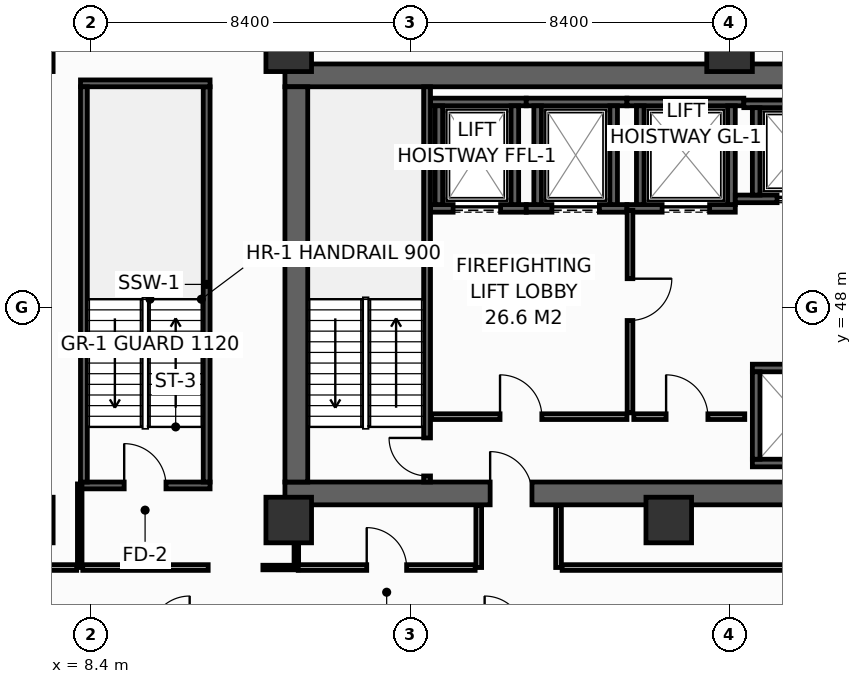
"""IFC4 building model, lengths in metres.
Left out: names, types, materials, properties, quantities, classifications, styles, units other than length and angle.
Written with IfcOpenShell. Run it as: python <this file> out.ifc"""

import sys

from ifc_helpers import new_model, si_unit, direction, frame, frame_2d, origin, origin_2d, place, context, subcontext, project, spatial, rectangle, hollow_rectangle, extrude, element, fill, save


model = new_model("IFC4")
c1 = context("Model", 3, precision=1e-05, world=origin(), true_north=direction((0.0, 1.0)))
c2 = subcontext(c1, "Body", "Model", "MODEL_VIEW")
j1 = project(units=[si_unit("LENGTHUNIT", "METRE"), si_unit("PLANEANGLEUNIT", "RADIAN")], contexts=[c1])
p1 = place(None, origin())
s1 = spatial("IfcSite", under=j1, at=p1, CompositionType="ELEMENT")
p2 = place(p1, origin())
s2 = spatial("IfcBuilding", under=s1, at=p2, CompositionType="ELEMENT")
p3 = place(p2, frame((0.0, 0.0, 64.8)))
s3 = spatial("IfcBuildingStorey", under=s2, at=p3, CompositionType="ELEMENT", Elevation=64.8)
p4 = place(p3, frame((13.5, 43.1, 0.0), z_axis=(0.0, 0.0, 1.0), x_axis=(1.0, 0.0, 0.0)))
e1 = element("IfcWall", 1, at=p4, inside=s3, PredefinedType="SHEAR", context=c2, shape_type="SweptSolid", body=[
    extrude(rectangle(XDim=32.9, YDim=0.6, at=frame_2d((16.45, 0.0))), origin(), (0.0, 0.0, 1.0), 4.15),
])
p5 = place(p4, frame((5.4, 0.0, 0.0)))
e2 = element("IfcOpeningElement", 2, at=p5, cuts=e1, PredefinedType="OPENING", context=c2, shape_type="SweptSolid", body=[
    extrude(rectangle(XDim=1.1, YDim=2.15, at=frame_2d((0.55, 1.075))), frame((0.0, 0.31, 0.0), z_axis=(0.0, -1.0, 0.0), x_axis=(1.0, 0.0, 0.0)), (0.0, 0.0, 1.0), 0.62),
])
p6 = place(p4, frame((25.6, 0.0, 0.0)))
e3 = element("IfcOpeningElement", 3, at=p6, cuts=e1, PredefinedType="OPENING", context=c2, shape_type="SweptSolid", body=[
    extrude(rectangle(XDim=1.1, YDim=2.15, at=frame_2d((0.55, 1.075))), frame((0.0, 0.31, 0.0), z_axis=(0.0, -1.0, 0.0), x_axis=(1.0, 0.0, 0.0)), (0.0, 0.0, 1.0), 0.62),
])
p7 = place(p3, frame((13.5, 54.1, 0.0), z_axis=(0.0, 0.0, 1.0), x_axis=(1.0, 0.0, 0.0)))
e4 = element("IfcWall", 4, at=p7, inside=s3, PredefinedType="SHEAR", context=c2, shape_type="SweptSolid", body=[
    extrude(rectangle(XDim=32.9, YDim=0.6, at=frame_2d((16.45, 0.0))), origin(), (0.0, 0.0, 1.0), 4.15),
])
p8 = place(p3, frame((13.8, 43.4, 0.0), z_axis=(0.0, 0.0, 1.0), x_axis=(0.0, 1.0, 0.0)))
e5 = element("IfcWall", 5, at=p8, inside=s3, PredefinedType="SHEAR", context=c2, shape_type="SweptSolid", body=[
    extrude(rectangle(XDim=10.4, YDim=0.6, at=frame_2d((5.2, 0.0))), origin(), (0.0, 0.0, 1.0), 4.15),
])
for number, where, z_axis, x_axis in (
    (6, (6.8, 54.8, 0.0), (0.0, 0.0, 1.0), (1.0, 0.0, 0.0)),
    (7, (13.6, 54.8, 0.0), (0.0, 0.0, 1.0), (1.0, 0.0, 0.0)),
    (8, (25.2, 54.8, 0.0), (0.0, 0.0, 1.0), (1.0, 0.0, 0.0)),
    (9, (6.8, 42.4, 0.0), (0.0, 0.0, 1.0), (1.0, 0.0, 0.0)),
    (10, (13.6, 42.4, 0.0), (0.0, 0.0, 1.0), (1.0, 0.0, 0.0)),
    (11, (23.6, 42.4, 0.0), (0.0, 0.0, 1.0), (1.0, 0.0, 0.0)),
):
    element("IfcColumn", number, at=place(p3, frame(where, z_axis=z_axis, x_axis=x_axis)), inside=s3, PredefinedType="COLUMN", context=c2, shape_type="SweptSolid", body=[
        extrude(hollow_rectangle(XDim=1.2, YDim=1.2, WallThickness=0.055, at=origin_2d()), origin(), (0.0, 0.0, 1.0), 4.4),
    ])
p9 = place(p3, frame((17.33, 50.6, 0.0), z_axis=(0.0, 0.0, 1.0), x_axis=(1.0, 0.0, 0.0)))
e12 = element("IfcWall", 12, at=p9, inside=s3, PredefinedType="SHEAR", context=c2, shape_type="SweptSolid", body=[
    extrude(rectangle(XDim=2.52, YDim=0.2, at=frame_2d((1.26, 0.0))), origin(), (0.0, 0.0, 1.0), 4.15),
])
p10 = place(p9, frame((0.595, 0.0, 0.0)))
e13 = element("IfcOpeningElement", 13, at=p10, cuts=e12, PredefinedType="OPENING", context=c2, shape_type="SweptSolid", body=[
    extrude(rectangle(XDim=1.25, YDim=2.3, at=frame_2d((0.625, 1.15))), frame((0.0, 0.11, 0.0), z_axis=(0.0, -1.0, 0.0), x_axis=(1.0, 0.0, 0.0)), (0.0, 0.0, 1.0), 0.22),
])
p11 = place(p3, frame((17.33, 53.4, 0.0), z_axis=(0.0, 0.0, 1.0), x_axis=(1.0, 0.0, 0.0)))
e14 = element("IfcWall", 14, at=p11, inside=s3, PredefinedType="SHEAR", context=c2, shape_type="SweptSolid", body=[
    extrude(rectangle(XDim=2.52, YDim=0.2, at=frame_2d((1.26, 0.0))), origin(), (0.0, 0.0, 1.0), 4.15),
])
for number, where, z_axis, x_axis in (
    (15, (17.55, 50.7, 0.0), (0.0, 0.0, 1.0), (0.0, 1.0, 0.0)),
    (16, (19.55, 50.7, 0.0), (0.0, 0.0, 1.0), (0.0, 1.0, 0.0)),
):
    element("IfcWall", number, at=place(p3, frame(where, z_axis=z_axis, x_axis=x_axis)), inside=s3, PredefinedType="SHEAR", context=c2, shape_type="SweptSolid", body=[
        extrude(rectangle(XDim=2.6, YDim=0.2, at=frame_2d((1.3, 0.0))), origin(), (0.0, 0.0, 1.0), 4.15),
    ])
p12 = place(p3, frame((19.85, 50.6, 0.0), z_axis=(0.0, 0.0, 1.0), x_axis=(1.0, 0.0, 0.0)))
e17 = element("IfcWall", 17, at=p12, inside=s3, PredefinedType="SHEAR", context=c2, shape_type="SweptSolid", body=[
    extrude(rectangle(XDim=2.65, YDim=0.2, at=frame_2d((1.325, 0.0))), origin(), (0.0, 0.0, 1.0), 4.15),
])
p13 = place(p12, frame((0.675, 0.0, 0.0)))
e18 = element("IfcOpeningElement", 18, at=p13, cuts=e17, PredefinedType="OPENING", context=c2, shape_type="SweptSolid", body=[
    extrude(rectangle(XDim=1.25, YDim=2.3, at=frame_2d((0.625, 1.15))), frame((0.0, 0.11, 0.0), z_axis=(0.0, -1.0, 0.0), x_axis=(1.0, 0.0, 0.0)), (0.0, 0.0, 1.0), 0.22),
])
p14 = place(p3, frame((19.85, 53.4, 0.0), z_axis=(0.0, 0.0, 1.0), x_axis=(1.0, 0.0, 0.0)))
e19 = element("IfcWall", 19, at=p14, inside=s3, PredefinedType="SHEAR", context=c2, shape_type="SweptSolid", body=[
    extrude(rectangle(XDim=2.65, YDim=0.2, at=frame_2d((1.325, 0.0))), origin(), (0.0, 0.0, 1.0), 4.15),
])
for number, where, z_axis, x_axis in (
    (20, (20.15, 50.7, 0.0), (0.0, 0.0, 1.0), (0.0, 1.0, 0.0)),
    (21, (22.15, 50.7, 0.0), (0.0, 0.0, 1.0), (0.0, 1.0, 0.0)),
):
    element("IfcWall", number, at=place(p3, frame(where, z_axis=z_axis, x_axis=x_axis)), inside=s3, PredefinedType="SHEAR", context=c2, shape_type="SweptSolid", body=[
        extrude(rectangle(XDim=2.6, YDim=0.2, at=frame_2d((1.3, 0.0))), origin(), (0.0, 0.0, 1.0), 4.15),
    ])
p15 = place(p3, frame((22.5, 50.6, 0.0), z_axis=(0.0, 0.0, 1.0), x_axis=(1.0, 0.0, 0.0)))
e22 = element("IfcWall", 22, at=p15, inside=s3, PredefinedType="SHEAR", context=c2, shape_type="SweptSolid", body=[
    extrude(rectangle(XDim=2.85, YDim=0.2, at=frame_2d((1.425, 0.0))), origin(), (0.0, 0.0, 1.0), 4.15),
])
p16 = place(p15, frame((0.925, 0.0, 0.0)))
e23 = element("IfcOpeningElement", 23, at=p16, cuts=e22, PredefinedType="OPENING", context=c2, shape_type="SweptSolid", body=[
    extrude(rectangle(XDim=1.25, YDim=2.3, at=frame_2d((0.625, 1.15))), frame((0.0, 0.11, 0.0), z_axis=(0.0, -1.0, 0.0), x_axis=(1.0, 0.0, 0.0)), (0.0, 0.0, 1.0), 0.22),
])
p17 = place(p3, frame((22.5, 53.4, 0.0), z_axis=(0.0, 0.0, 1.0), x_axis=(1.0, 0.0, 0.0)))
e24 = element("IfcWall", 24, at=p17, inside=s3, PredefinedType="SHEAR", context=c2, shape_type="SweptSolid", body=[
    extrude(rectangle(XDim=3.075, YDim=0.2, at=frame_2d((1.538, 0.0))), origin(), (0.0, 0.0, 1.0), 4.15),
])
for number, where, z_axis, x_axis in (
    (25, (22.85, 50.7, 0.0), (0.0, 0.0, 1.0), (0.0, 1.0, 0.0)),
    (26, (25.25, 50.7, 0.0), (0.0, 0.0, 1.0), (0.0, 1.0, 0.0)),
):
    element("IfcWall", number, at=place(p3, frame(where, z_axis=z_axis, x_axis=x_axis)), inside=s3, PredefinedType="SHEAR", context=c2, shape_type="SweptSolid", body=[
        extrude(rectangle(XDim=2.6, YDim=0.2, at=frame_2d((1.3, 0.0))), origin(), (0.0, 0.0, 1.0), 4.15),
    ])
p18 = place(p3, frame((25.35, 50.85, 0.0), z_axis=(0.0, 0.0, 1.0), x_axis=(1.0, 0.0, 0.0)))
e27 = element("IfcWall", 27, at=p18, inside=s3, PredefinedType="SHEAR", context=c2, shape_type="SweptSolid", body=[
    extrude(rectangle(XDim=3.025, YDim=0.2, at=frame_2d((1.512, 0.0))), origin(), (0.0, 0.0, 1.0), 4.15),
])
p19 = place(p18, frame((1.1, 0.0, 0.0)))
e28 = element("IfcOpeningElement", 28, at=p19, cuts=e27, PredefinedType="OPENING", context=c2, shape_type="SweptSolid", body=[
    extrude(rectangle(XDim=1.1, YDim=2.2, at=frame_2d((0.55, 1.1))), frame((0.0, 0.11, 0.0), z_axis=(0.0, -1.0, 0.0), x_axis=(1.0, 0.0, 0.0)), (0.0, 0.0, 1.0), 0.22),
])
p20 = place(p3, frame((25.575, 53.35, 0.0), z_axis=(0.0, 0.0, 1.0), x_axis=(1.0, 0.0, 0.0)))
e29 = element("IfcWall", 29, at=p20, inside=s3, PredefinedType="SHEAR", context=c2, shape_type="SweptSolid", body=[
    extrude(rectangle(XDim=2.8, YDim=0.2, at=frame_2d((1.4, 0.0))), origin(), (0.0, 0.0, 1.0), 4.15),
])
p21 = place(p3, frame((25.9, 50.95, 0.0), z_axis=(0.0, 0.0, 1.0), x_axis=(0.0, 1.0, 0.0)))
e30 = element("IfcWall", 30, at=p21, inside=s3, PredefinedType="SHEAR", context=c2, shape_type="SweptSolid", body=[
    extrude(rectangle(XDim=2.3, YDim=0.2, at=frame_2d((1.15, 0.0))), origin(), (0.0, 0.0, 1.0), 4.15),
])
for number, where, z_axis, x_axis in (
    (31, (25.8, 43.9, 0.0), (0.0, 0.0, 1.0), (1.0, 0.0, 0.0)),
    (32, (25.8, 46.4, 0.0), (0.0, 0.0, 1.0), (1.0, 0.0, 0.0)),
):
    element("IfcWall", number, at=place(p3, frame(where, z_axis=z_axis, x_axis=x_axis)), inside=s3, PredefinedType="SHEAR", context=c2, shape_type="SweptSolid", body=[
        extrude(rectangle(XDim=2.575, YDim=0.2, at=frame_2d((1.288, 0.0))), origin(), (0.0, 0.0, 1.0), 4.15),
    ])
p22 = place(p3, frame((25.9, 44.0, 0.0), z_axis=(0.0, 0.0, 1.0), x_axis=(0.0, 1.0, 0.0)))
e33 = element("IfcWall", 33, at=p22, inside=s3, PredefinedType="SHEAR", context=c2, shape_type="SweptSolid", body=[
    extrude(rectangle(XDim=2.3, YDim=0.2, at=frame_2d((1.15, 0.0))), origin(), (0.0, 0.0, 1.0), 4.15),
])
p23 = place(p3, frame((17.24, 43.4, 0.0), z_axis=(0.0, 0.0, 1.0), x_axis=(0.0, 1.0, 0.0)))
e34 = element("IfcWall", 34, at=p23, inside=s3, PredefinedType="SHEAR", context=c2, shape_type="SweptSolid", body=[
    extrude(rectangle(XDim=10.4, YDim=0.18, at=frame_2d((5.2, 0.0))), origin(), (0.0, 0.0, 1.0), 4.15),
])
p24 = place(p23, frame((0.16, 0.0, 0.0)))
e35 = element("IfcOpeningElement", 35, at=p24, cuts=e34, PredefinedType="OPENING", context=c2, shape_type="SweptSolid", body=[
    extrude(rectangle(XDim=1.0, YDim=2.15, at=frame_2d((0.5, 1.075))), frame((0.0, 0.1, 0.0), z_axis=(0.0, -1.0, 0.0), x_axis=(1.0, 0.0, 0.0)), (0.0, 0.0, 1.0), 0.2),
])
p25 = place(p3, frame((8.12, 43.31, 0.0), z_axis=(0.0, 0.0, 1.0), x_axis=(1.0, 0.0, 0.0)))
e36 = element("IfcWall", 36, at=p25, inside=s3, PredefinedType="SHEAR", context=c2, shape_type="SweptSolid", body=[
    extrude(rectangle(XDim=3.41, YDim=0.18, at=frame_2d((1.705, 0.0))), origin(), (0.0, 0.0, 1.0), 4.15),
])
p26 = place(p25, frame((1.15, 0.0, 0.0)))
e37 = element("IfcOpeningElement", 37, at=p26, cuts=e36, PredefinedType="OPENING", context=c2, shape_type="SweptSolid", body=[
    extrude(rectangle(XDim=1.1, YDim=2.15, at=frame_2d((0.55, 1.075))), frame((0.0, 0.1, 0.0), z_axis=(0.0, -1.0, 0.0), x_axis=(1.0, 0.0, 0.0)), (0.0, 0.0, 1.0), 0.2),
])
p27 = place(p3, frame((11.44, 43.4, 0.0), z_axis=(0.0, 0.0, 1.0), x_axis=(0.0, 1.0, 0.0)))
e38 = element("IfcWall", 38, at=p27, inside=s3, PredefinedType="SHEAR", context=c2, shape_type="SweptSolid", body=[
    extrude(rectangle(XDim=10.4, YDim=0.18, at=frame_2d((5.2, 0.0))), origin(), (0.0, 0.0, 1.0), 4.15),
])
p28 = place(p3, frame((11.53, 53.89, 0.0), z_axis=(0.0, 0.0, 1.0), x_axis=(-1.0, 0.0, 0.0)))
e39 = element("IfcWall", 39, at=p28, inside=s3, PredefinedType="SHEAR", context=c2, shape_type="SweptSolid", body=[
    extrude(rectangle(XDim=3.41, YDim=0.18, at=frame_2d((1.705, 0.0))), origin(), (0.0, 0.0, 1.0), 4.15),
])
p29 = place(p3, frame((8.21, 53.8, 0.0), z_axis=(0.0, 0.0, 1.0), x_axis=(0.0, -1.0, 0.0)))
e40 = element("IfcWall", 40, at=p29, inside=s3, PredefinedType="SHEAR", context=c2, shape_type="SweptSolid", body=[
    extrude(rectangle(XDim=10.4, YDim=0.18, at=frame_2d((5.2, 0.0))), origin(), (0.0, 0.0, 1.0), 4.15),
])
p30 = place(p3, frame((17.36, 45.12, 0.0), z_axis=(0.0, 0.0, 1.0), x_axis=(1.0, 0.0, 0.0)))
e41 = element("IfcWall", 41, at=p30, inside=s3, PredefinedType="PARTITIONING", context=c2, shape_type="SweptSolid", body=[
    extrude(rectangle(XDim=5.14, YDim=0.15, at=frame_2d((2.57, 0.0))), origin(), (0.0, 0.0, 1.0), 4.15),
])
p31 = place(p30, frame((1.8, 0.0, 0.0)))
e42 = element("IfcOpeningElement", 42, at=p31, cuts=e41, PredefinedType="OPENING", context=c2, shape_type="SweptSolid", body=[
    extrude(rectangle(XDim=1.1, YDim=2.15, at=frame_2d((0.55, 1.075))), frame((0.0, 0.085, 0.0), z_axis=(0.0, -1.0, 0.0), x_axis=(1.0, 0.0, 0.0)), (0.0, 0.0, 1.0), 0.17),
])
p32 = place(p3, frame((22.58, 50.55, 0.0), z_axis=(0.0, 0.0, 1.0), x_axis=(0.0, -1.0, 0.0)))
e43 = element("IfcWall", 43, at=p32, inside=s3, PredefinedType="PARTITIONING", context=c2, shape_type="SweptSolid", body=[
    extrude(rectangle(XDim=5.33, YDim=0.15, at=frame_2d((2.665, 0.0))), origin(), (0.0, 0.0, 1.0), 4.15),
])
p33 = place(p32, frame((1.8, 0.0, 0.0)))
e44 = element("IfcOpeningElement", 44, at=p33, cuts=e43, PredefinedType="OPENING", context=c2, shape_type="SweptSolid", body=[
    extrude(rectangle(XDim=1.1, YDim=2.15, at=frame_2d((0.55, 1.075))), frame((0.0, 0.085, 0.0), z_axis=(0.0, -1.0, 0.0), x_axis=(1.0, 0.0, 0.0)), (0.0, 0.0, 1.0), 0.17),
])
p34 = place(p3, frame((22.68, 45.12, 0.0), z_axis=(0.0, 0.0, 1.0), x_axis=(1.0, 0.0, 0.0)))
e45 = element("IfcWall", 45, at=p34, inside=s3, PredefinedType="PARTITIONING", context=c2, shape_type="SweptSolid", body=[
    extrude(rectangle(XDim=2.92, YDim=0.15, at=frame_2d((1.46, 0.0))), origin(), (0.0, 0.0, 1.0), 4.15),
])
p35 = place(p34, frame((0.85, 0.0, 0.0)))
e46 = element("IfcOpeningElement", 46, at=p35, cuts=e45, PredefinedType="OPENING", context=c2, shape_type="SweptSolid", body=[
    extrude(rectangle(XDim=1.1, YDim=2.15, at=frame_2d((0.55, 1.075))), frame((0.0, 0.085, 0.0), z_axis=(0.0, -1.0, 0.0), x_axis=(1.0, 0.0, 0.0)), (0.0, 0.0, 1.0), 0.17),
])
p36 = place(p3, frame((12.92, 41.15, 0.0), z_axis=(0.0, 0.0, 1.0), x_axis=(1.0, 0.0, 0.0)))
e47 = element("IfcWall", 47, at=p36, inside=s3, PredefinedType="PARTITIONING", context=c2, shape_type="SweptSolid", body=[
    extrude(rectangle(XDim=0.93, YDim=0.12, at=frame_2d((0.465, 0.0))), origin(), (0.0, 0.0, 1.0), 4.15),
])
p37 = place(p3, frame((13.8, 41.23, 0.0), z_axis=(0.0, 0.0, 1.0), x_axis=(0.0, 1.0, 0.0)))
e48 = element("IfcWall", 48, at=p37, inside=s3, PredefinedType="PARTITIONING", context=c2, shape_type="SweptSolid", body=[
    extrude(rectangle(XDim=1.55, YDim=0.12, at=frame_2d((0.775, 0.0))), origin(), (0.0, 0.0, 1.0), 4.15),
])
p38 = place(p3, frame((8.1, 41.15, 0.0), z_axis=(0.0, 0.0, 1.0), x_axis=(0.0, 1.0, 0.0)))
e49 = element("IfcWall", 49, at=p38, inside=s3, PredefinedType="PARTITIONING", context=c2, shape_type="SweptSolid", body=[
    extrude(rectangle(XDim=2.2, YDim=0.12, at=frame_2d((1.1, 0.0))), origin(), (0.0, 0.0, 1.0), 3.335),
])
p39 = place(p3, frame((8.18, 41.15, 0.0), z_axis=(0.0, 0.0, 1.0), x_axis=(1.0, 0.0, 0.0)))
e50 = element("IfcWall", 50, at=p39, inside=s3, PredefinedType="PARTITIONING", context=c2, shape_type="SweptSolid", body=[
    extrude(rectangle(XDim=3.3, YDim=0.15, at=frame_2d((1.65, 0.0))), origin(), (0.0, 0.0, 1.0), 4.15),
])
p40 = place(p3, frame((5.914, 41.15, 0.0), z_axis=(0.0, 0.0, 1.0), x_axis=(1.0, 0.0, 0.0)))
e51 = element("IfcWall", 51, at=p40, inside=s3, PredefinedType="PARTITIONING", context=c2, shape_type="SweptSolid", body=[
    extrude(rectangle(XDim=2.106, YDim=0.15, at=frame_2d((1.053, 0.0))), origin(), (0.0, 0.0, 1.0), 3.635),
])
for number, where, z_axis, x_axis in (
    (52, (18.6, 41.15, 0.0), (0.0, 0.0, 1.0), (0.0, 1.0, 0.0)),
    (53, (20.7, 41.15, 0.0), (0.0, 0.0, 1.0), (0.0, 1.0, 0.0)),
):
    element("IfcWall", number, at=place(p3, frame(where, z_axis=z_axis, x_axis=x_axis)), inside=s3, PredefinedType="PARTITIONING", context=c2, shape_type="SweptSolid", body=[
        extrude(rectangle(XDim=1.63, YDim=0.15, at=frame_2d((0.815, 0.0))), origin(), (0.0, 0.0, 1.0), 4.15),
    ])
p41 = place(p3, frame((13.85, 41.15, 0.0), z_axis=(0.0, 0.0, 1.0), x_axis=(1.0, 0.0, 0.0)))
e54 = element("IfcWall", 54, at=p41, inside=s3, PredefinedType="PARTITIONING", context=c2, shape_type="SweptSolid", body=[
    extrude(rectangle(XDim=4.655, YDim=0.15, at=frame_2d((2.327, 0.0))), origin(), (0.0, 0.0, 1.0), 4.15),
])
p42 = place(p41, frame((1.802, 0.0, 0.0)))
e55 = element("IfcOpeningElement", 55, at=p42, cuts=e54, PredefinedType="OPENING", context=c2, shape_type="SweptSolid", body=[
    extrude(rectangle(XDim=1.05, YDim=2.15, at=frame_2d((0.525, 1.075))), frame((0.0, 0.085, 0.0), z_axis=(0.0, -1.0, 0.0), x_axis=(1.0, 0.0, 0.0)), (0.0, 0.0, 1.0), 0.17),
])
p43 = place(p3, frame((20.795, 41.15, 0.0), z_axis=(0.0, 0.0, 1.0), x_axis=(1.0, 0.0, 0.0)))
e56 = element("IfcWall", 56, at=p43, inside=s3, PredefinedType="PARTITIONING", context=c2, shape_type="SweptSolid", body=[
    extrude(rectangle(XDim=17.91, YDim=0.15, at=frame_2d((8.955, 0.0))), origin(), (0.0, 0.0, 1.0), 3.335),
])
p44 = place(p43, frame((8.43, 0.0, 0.0)))
e57 = element("IfcOpeningElement", 57, at=p44, cuts=e56, PredefinedType="OPENING", context=c2, shape_type="SweptSolid", body=[
    extrude(rectangle(XDim=1.05, YDim=2.15, at=frame_2d((0.525, 1.075))), frame((0.0, 0.085, 0.0), z_axis=(0.0, -1.0, 0.0), x_axis=(1.0, 0.0, 0.0)), (0.0, 0.0, 1.0), 0.17),
])
p45 = place(p10, origin())
e58 = element("IfcDoor", 58, at=p45, inside=s3, OperationType="SLIDING_TO_LEFT", PredefinedType="DOOR", context=c2, shape_type="SweptSolid", body=[
    extrude(rectangle(XDim=1.25, YDim=2.3, at=frame_2d((0.625, 1.15))), frame((0.0, 0.025, 0.0), z_axis=(0.0, -1.0, 0.0), x_axis=(1.0, 0.0, 0.0)), (0.0, 0.0, 1.0), 0.05),
])
fill(e13, e58)
p46 = place(p13, origin())
e59 = element("IfcDoor", 59, at=p46, inside=s3, OperationType="SLIDING_TO_LEFT", PredefinedType="DOOR", context=c2, shape_type="SweptSolid", body=[
    extrude(rectangle(XDim=1.25, YDim=2.3, at=frame_2d((0.625, 1.15))), frame((0.0, 0.025, 0.0), z_axis=(0.0, -1.0, 0.0), x_axis=(1.0, 0.0, 0.0)), (0.0, 0.0, 1.0), 0.05),
])
fill(e18, e59)
p47 = place(p16, origin())
e60 = element("IfcDoor", 60, at=p47, inside=s3, OperationType="SLIDING_TO_LEFT", PredefinedType="DOOR", context=c2, shape_type="SweptSolid", body=[
    extrude(rectangle(XDim=1.25, YDim=2.3, at=frame_2d((0.625, 1.15))), frame((0.0, 0.025, 0.0), z_axis=(0.0, -1.0, 0.0), x_axis=(1.0, 0.0, 0.0)), (0.0, 0.0, 1.0), 0.05),
])
fill(e23, e60)
p48 = place(p19, origin())
e61 = element("IfcDoor", 61, at=p48, inside=s3, OperationType="SLIDING_TO_LEFT", PredefinedType="DOOR", context=c2, shape_type="SweptSolid", body=[
    extrude(rectangle(XDim=1.1, YDim=2.2, at=frame_2d((0.55, 1.1))), frame((0.0, 0.025, 0.0), z_axis=(0.0, -1.0, 0.0), x_axis=(1.0, 0.0, 0.0)), (0.0, 0.0, 1.0), 0.05),
])
fill(e28, e61)
p49 = place(p24, origin())
e62 = element("IfcDoor", 62, at=p49, inside=s3, OperationType="SINGLE_SWING_RIGHT", PredefinedType="DOOR", context=c2, shape_type="SweptSolid", body=[
    extrude(rectangle(XDim=1.0, YDim=2.15, at=frame_2d((0.5, 1.075))), frame((0.0, 0.025, 0.0), z_axis=(0.0, -1.0, 0.0), x_axis=(1.0, 0.0, 0.0)), (0.0, 0.0, 1.0), 0.05),
])
fill(e35, e62)
p50 = place(p26, origin())
e63 = element("IfcDoor", 63, at=p50, inside=s3, OperationType="SINGLE_SWING_LEFT", PredefinedType="DOOR", context=c2, shape_type="SweptSolid", body=[
    extrude(rectangle(XDim=1.1, YDim=2.15, at=frame_2d((0.55, 1.075))), frame((0.0, 0.025, 0.0), z_axis=(0.0, -1.0, 0.0), x_axis=(1.0, 0.0, 0.0)), (0.0, 0.0, 1.0), 0.05),
])
fill(e37, e63)
p51 = place(p31, origin())
e64 = element("IfcDoor", 64, at=p51, inside=s3, OperationType="SINGLE_SWING_LEFT", PredefinedType="DOOR", context=c2, shape_type="SweptSolid", body=[
    extrude(rectangle(XDim=1.1, YDim=2.15, at=frame_2d((0.55, 1.075))), frame((0.0, 0.025, 0.0), z_axis=(0.0, -1.0, 0.0), x_axis=(1.0, 0.0, 0.0)), (0.0, 0.0, 1.0), 0.05),
])
fill(e42, e64)
p52 = place(p33, origin())
e65 = element("IfcDoor", 65, at=p52, inside=s3, OperationType="SINGLE_SWING_LEFT", PredefinedType="DOOR", context=c2, shape_type="SweptSolid", body=[
    extrude(rectangle(XDim=1.1, YDim=2.15, at=frame_2d((0.55, 1.075))), frame((0.0, 0.025, 0.0), z_axis=(0.0, -1.0, 0.0), x_axis=(1.0, 0.0, 0.0)), (0.0, 0.0, 1.0), 0.05),
])
fill(e44, e65)
p53 = place(p35, origin())
e66 = element("IfcDoor", 66, at=p53, inside=s3, OperationType="SINGLE_SWING_LEFT", PredefinedType="DOOR", context=c2, shape_type="SweptSolid", body=[
    extrude(rectangle(XDim=1.1, YDim=2.15, at=frame_2d((0.55, 1.075))), frame((0.0, 0.025, 0.0), z_axis=(0.0, -1.0, 0.0), x_axis=(1.0, 0.0, 0.0)), (0.0, 0.0, 1.0), 0.05),
])
fill(e46, e66)
p54 = place(p5, origin())
e67 = element("IfcDoor", 67, at=p54, inside=s3, OperationType="SINGLE_SWING_LEFT", PredefinedType="DOOR", context=c2, shape_type="SweptSolid", body=[
    extrude(rectangle(XDim=1.1, YDim=2.15, at=frame_2d((0.55, 1.075))), frame((0.0, 0.025, 0.0), z_axis=(0.0, -1.0, 0.0), x_axis=(1.0, 0.0, 0.0)), (0.0, 0.0, 1.0), 0.05),
])
fill(e2, e67)
p55 = place(p42, origin())
e68 = element("IfcDoor", 68, at=p55, inside=s3, OperationType="SINGLE_SWING_LEFT", PredefinedType="DOOR", context=c2, shape_type="SweptSolid", body=[
    extrude(rectangle(XDim=1.05, YDim=2.15, at=frame_2d((0.525, 1.075))), frame((0.0, 0.025, 0.0), z_axis=(0.0, -1.0, 0.0), x_axis=(1.0, 0.0, 0.0)), (0.0, 0.0, 1.0), 0.05),
])
fill(e55, e68)
save(model, sys.argv[1])
